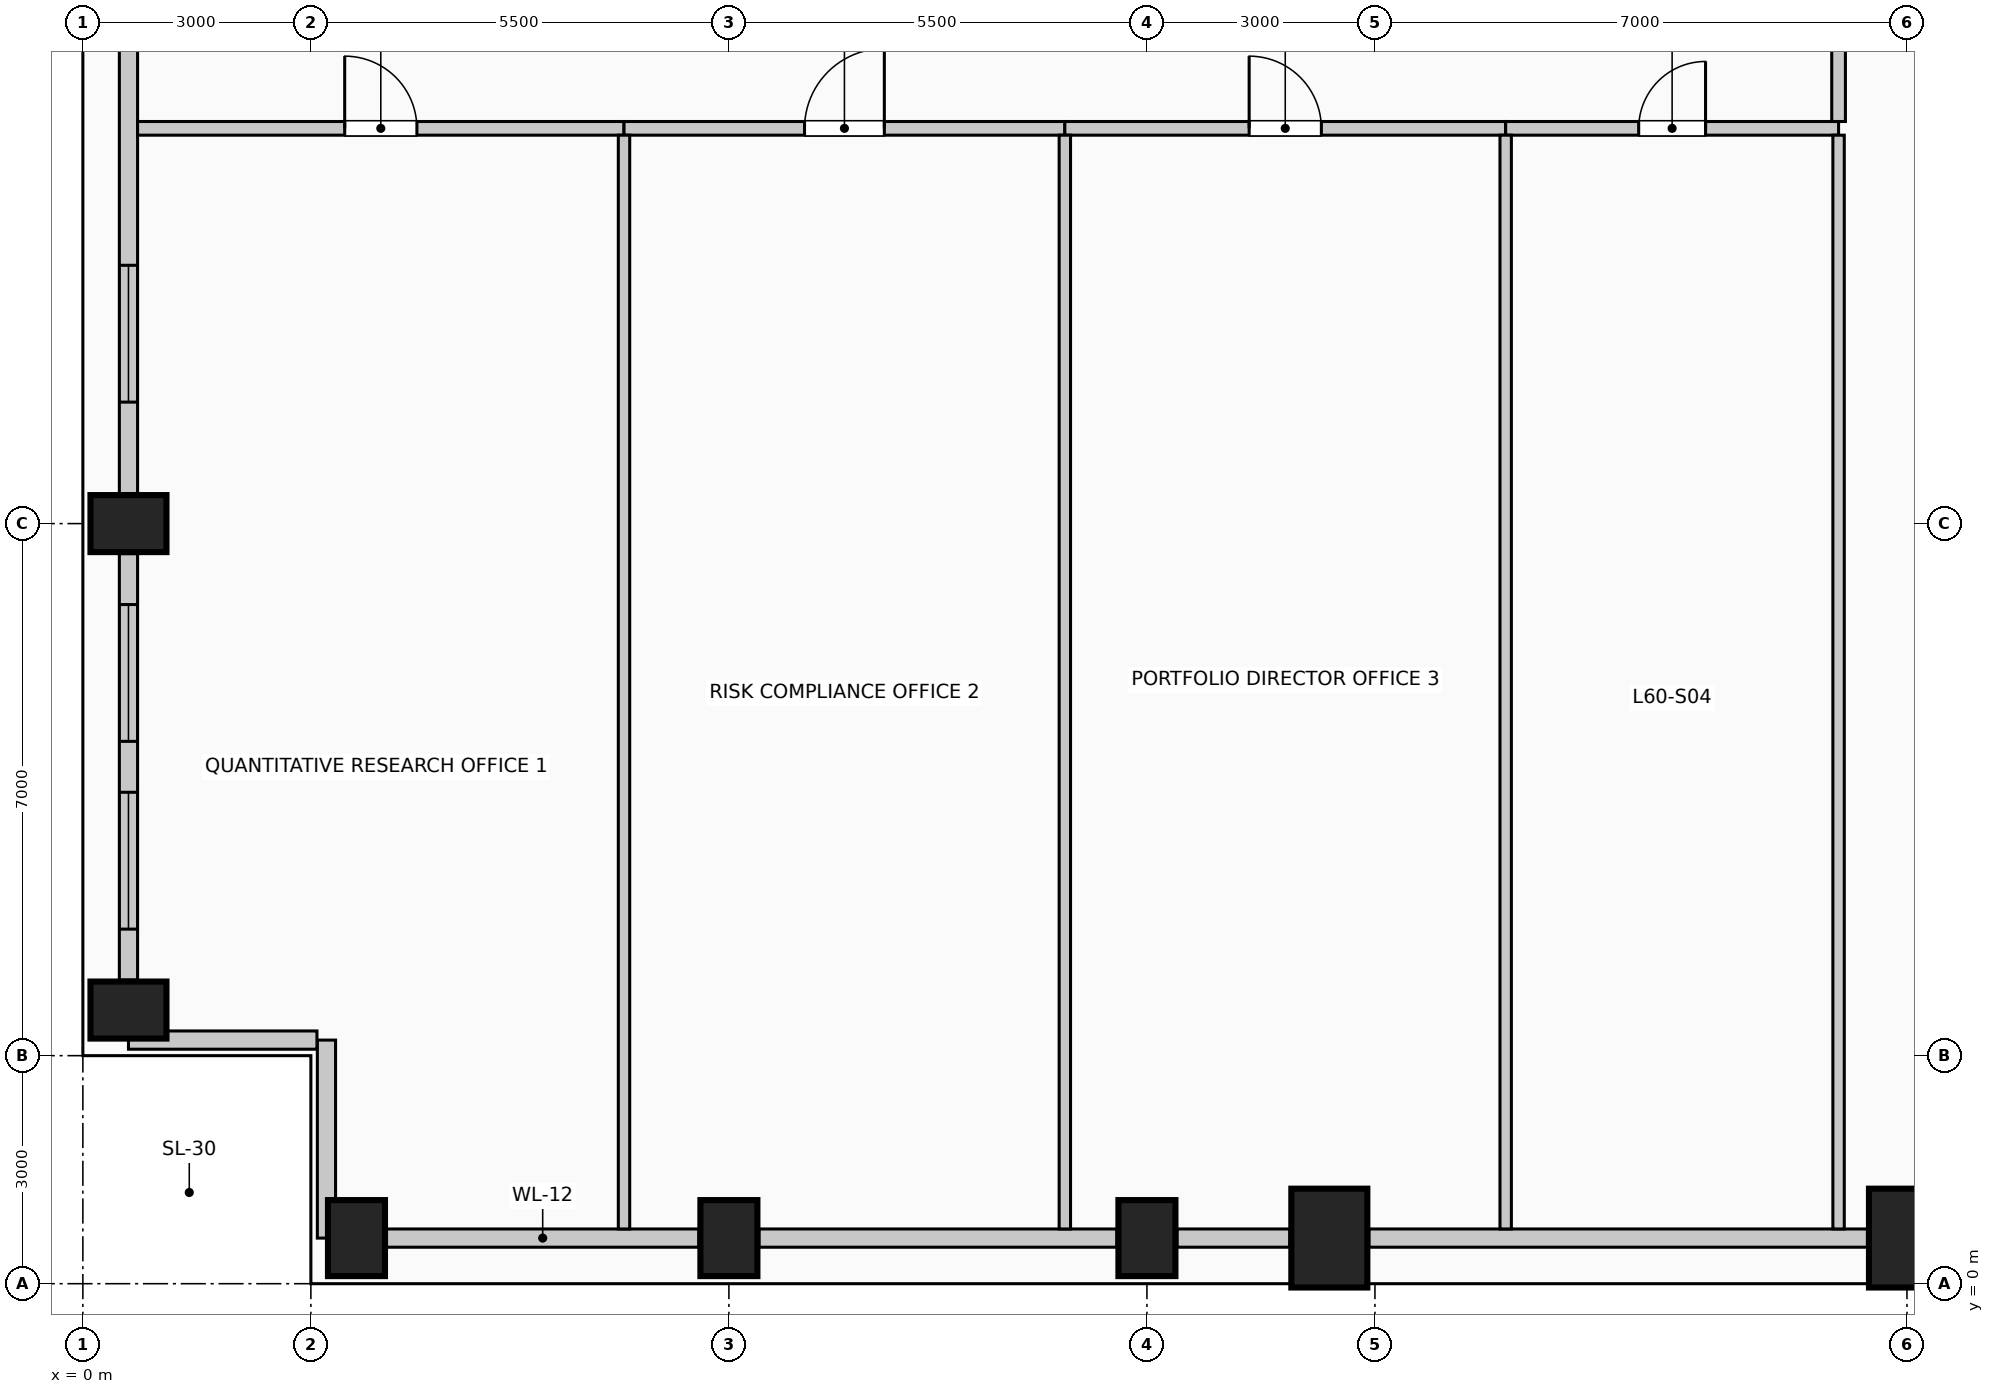
"""IFC4 building model, lengths in metres.
Left out: names, types, materials, properties, quantities, classifications, styles, units other than length and angle.
Written with IfcOpenShell. Run it as: python <this file> out.ifc"""

import sys

from ifc_helpers import new_model, si_unit, direction, frame, frame_2d, origin, origin_2d, place, context, subcontext, project, spatial, rectangle, extrude, element, fill, save


model = new_model("IFC4")
c1 = context("Model", 3, precision=1e-05, world=origin(), true_north=direction((0.0, 1.0)))
c2 = subcontext(c1, "Body", "Model", "MODEL_VIEW")
j1 = project(units=[si_unit("LENGTHUNIT", "METRE"), si_unit("PLANEANGLEUNIT", "RADIAN")], contexts=[c1])
p1 = place(None, origin())
s1 = spatial("IfcSite", under=j1, at=p1, CompositionType="ELEMENT")
p2 = place(p1, origin())
s2 = spatial("IfcBuilding", under=s1, at=p2, CompositionType="ELEMENT")
p3 = place(p2, frame((0.0, 0.0, 248.6)))
s3 = spatial("IfcBuildingStorey", under=s2, at=p3, CompositionType="ELEMENT", Elevation=248.6)
for number, where, z_axis, x_axis in (
    (1, (3.6, 0.6, 0.0), (0.0, 0.0, 1.0), (1.0, 0.0, 0.0)),
    (2, (8.5, 0.6, 0.0), (0.0, 0.0, 1.0), (1.0, 0.0, 0.0)),
    (3, (14.0, 0.6, 0.0), (0.0, 0.0, 1.0), (1.0, 0.0, 0.0)),
):
    element("IfcColumn", number, at=place(p3, frame(where, z_axis=z_axis, x_axis=x_axis)), inside=s3, PredefinedType="COLUMN", context=c2, shape_type="SweptSolid", body=[
        extrude(rectangle(XDim=0.75, YDim=1.0, at=origin_2d()), origin(), (0.0, 0.0, 1.0), 4.0),
    ])
for number, where, z_axis, x_axis in (
    (4, (16.4, 0.6, 0.0), (0.0, 0.0, 1.0), (1.0, 0.0, 0.0)),
    (5, (24.0, 0.6, 0.0), (0.0, 0.0, 1.0), (1.0, 0.0, 0.0)),
):
    element("IfcColumn", number, at=place(p3, frame(where, z_axis=z_axis, x_axis=x_axis)), inside=s3, PredefinedType="COLUMN", context=c2, shape_type="SweptSolid", body=[
        extrude(rectangle(XDim=1.0, YDim=1.3, at=origin_2d()), origin(), (0.0, 0.0, 1.0), 4.0),
    ])
for number, where, z_axis, x_axis in (
    (6, (0.6, 3.6, 0.0), (0.0, 0.0, 1.0), (0.0, 1.0, 0.0)),
    (7, (0.6, 10.0, 0.0), (0.0, 0.0, 1.0), (0.0, 1.0, 0.0)),
):
    element("IfcColumn", number, at=place(p3, frame(where, z_axis=z_axis, x_axis=x_axis)), inside=s3, PredefinedType="COLUMN", context=c2, shape_type="SweptSolid", body=[
        extrude(rectangle(XDim=0.75, YDim=1.0, at=origin_2d()), origin(), (0.0, 0.0, 1.0), 4.0),
    ])
p4 = place(p3, frame((8.105, 0.6, 0.0), z_axis=(0.0, 0.0, 1.0), x_axis=(-1.0, 0.0, 0.0)))
e8 = element("IfcWall", 8, at=p4, inside=s3, PredefinedType="SOLIDWALL", context=c2, shape_type="SweptSolid", body=[
    extrude(rectangle(XDim=4.11, YDim=0.24, at=frame_2d((2.055, 0.0))), origin(), (0.0, 0.0, 1.0), 3.0),
])
p5 = place(p3, frame((13.605, 0.6, 0.0), z_axis=(0.0, 0.0, 1.0), x_axis=(-1.0, 0.0, 0.0)))
e9 = element("IfcWall", 9, at=p5, inside=s3, PredefinedType="SOLIDWALL", context=c2, shape_type="SweptSolid", body=[
    extrude(rectangle(XDim=4.71, YDim=0.24, at=frame_2d((2.355, 0.0))), origin(), (0.0, 0.0, 1.0), 3.0),
])
p6 = place(p3, frame((15.88, 0.6, 0.0), z_axis=(0.0, 0.0, 1.0), x_axis=(-1.0, 0.0, 0.0)))
e10 = element("IfcWall", 10, at=p6, inside=s3, PredefinedType="SOLIDWALL", context=c2, shape_type="SweptSolid", body=[
    extrude(rectangle(XDim=1.485, YDim=0.24, at=frame_2d((0.742, 0.0))), origin(), (0.0, 0.0, 1.0), 3.0),
])
p7 = place(p3, frame((23.48, 0.6, 0.0), z_axis=(0.0, 0.0, 1.0), x_axis=(-1.0, 0.0, 0.0)))
e11 = element("IfcWall", 11, at=p7, inside=s3, PredefinedType="SOLIDWALL", context=c2, shape_type="SweptSolid", body=[
    extrude(rectangle(XDim=6.56, YDim=0.24, at=frame_2d((3.28, 0.0))), origin(), (0.0, 0.0, 1.0), 3.0),
])
p8 = place(p3, frame((0.6, 3.995, 0.0), z_axis=(0.0, 0.0, 1.0), x_axis=(0.0, 1.0, 0.0)))
e12 = element("IfcWall", 12, at=p8, inside=s3, PredefinedType="SOLIDWALL", context=c2, shape_type="SweptSolid", body=[
    extrude(rectangle(XDim=5.61, YDim=0.24, at=frame_2d((2.805, 0.0))), origin(), (0.0, 0.0, 1.0), 3.0),
])
p9 = place(p8, frame((0.67, 0.0, 0.42)))
e13 = element("IfcOpeningElement", 13, at=p9, cuts=e12, PredefinedType="OPENING", context=c2, shape_type="SweptSolid", body=[
    extrude(rectangle(XDim=1.8, YDim=2.2, at=frame_2d((0.9, 1.1))), frame((0.0, 0.13, 0.0), z_axis=(0.0, -1.0, 0.0), x_axis=(1.0, 0.0, 0.0)), (0.0, 0.0, 1.0), 0.26),
])
p10 = place(p8, frame((3.14, 0.0, 0.42)))
e14 = element("IfcOpeningElement", 14, at=p10, cuts=e12, PredefinedType="OPENING", context=c2, shape_type="SweptSolid", body=[
    extrude(rectangle(XDim=1.8, YDim=2.2, at=frame_2d((0.9, 1.1))), frame((0.0, 0.13, 0.0), z_axis=(0.0, -1.0, 0.0), x_axis=(1.0, 0.0, 0.0)), (0.0, 0.0, 1.0), 0.26),
])
p11 = place(p3, frame((0.6, 10.395, 0.0), z_axis=(0.0, 0.0, 1.0), x_axis=(0.0, 1.0, 0.0)))
e15 = element("IfcWall", 15, at=p11, inside=s3, PredefinedType="SOLIDWALL", context=c2, shape_type="SweptSolid", body=[
    extrude(rectangle(XDim=7.21, YDim=0.24, at=frame_2d((3.605, 0.0))), origin(), (0.0, 0.0, 1.0), 3.0),
])
p12 = place(p11, frame((1.203, 0.0, 0.42)))
e16 = element("IfcOpeningElement", 16, at=p12, cuts=e15, PredefinedType="OPENING", context=c2, shape_type="SweptSolid", body=[
    extrude(rectangle(XDim=1.8, YDim=2.2, at=frame_2d((0.9, 1.1))), frame((0.0, 0.13, 0.0), z_axis=(0.0, -1.0, 0.0), x_axis=(1.0, 0.0, 0.0)), (0.0, 0.0, 1.0), 0.26),
])
p13 = place(p3, frame((3.205, 0.6, 0.0), z_axis=(0.0, 0.0, 1.0), x_axis=(0.0, 1.0, 0.0)))
e17 = element("IfcWall", 17, at=p13, inside=s3, PredefinedType="SOLIDWALL", context=c2, shape_type="SweptSolid", body=[
    extrude(rectangle(XDim=2.605, YDim=0.24, at=frame_2d((1.302, 0.0))), origin(), (0.0, 0.0, 1.0), 3.75),
])
p14 = place(p3, frame((3.08, 3.205, 0.0), z_axis=(0.0, 0.0, 1.0), x_axis=(-1.0, 0.0, 0.0)))
e18 = element("IfcWall", 18, at=p14, inside=s3, PredefinedType="SOLIDWALL", context=c2, shape_type="SweptSolid", body=[
    extrude(rectangle(XDim=2.48, YDim=0.24, at=frame_2d((1.24, 0.0))), origin(), (0.0, 0.0, 1.0), 3.75),
])
p15 = place(p3, frame((0.72, 15.2, 0.0), z_axis=(0.0, 0.0, 1.0), x_axis=(1.0, 0.0, 0.0)))
e19 = element("IfcWall", 19, at=p15, inside=s3, PredefinedType="PARTITIONING", context=c2, shape_type="SweptSolid", body=[
    extrude(rectangle(XDim=6.4, YDim=0.18, at=frame_2d((3.2, 0.0))), origin(), (0.0, 0.0, 1.0), 3.75),
])
p16 = place(p15, frame((2.725, 0.0, 0.0)))
e20 = element("IfcOpeningElement", 20, at=p16, cuts=e19, PredefinedType="OPENING", context=c2, shape_type="SweptSolid", body=[
    extrude(rectangle(XDim=0.95, YDim=2.15, at=frame_2d((0.475, 1.075))), frame((0.0, 0.1, 0.0), z_axis=(0.0, -1.0, 0.0), x_axis=(1.0, 0.0, 0.0)), (0.0, 0.0, 1.0), 0.2),
])
p17 = place(p3, frame((7.12, 15.2, 0.0), z_axis=(0.0, 0.0, 1.0), x_axis=(1.0, 0.0, 0.0)))
e21 = element("IfcWall", 21, at=p17, inside=s3, PredefinedType="PARTITIONING", context=c2, shape_type="SweptSolid", body=[
    extrude(rectangle(XDim=5.8, YDim=0.18, at=frame_2d((2.9, 0.0))), origin(), (0.0, 0.0, 1.0), 3.75),
])
p18 = place(p17, frame((2.375, 0.0, 0.0)))
e22 = element("IfcOpeningElement", 22, at=p18, cuts=e21, PredefinedType="OPENING", context=c2, shape_type="SweptSolid", body=[
    extrude(rectangle(XDim=1.05, YDim=2.15, at=frame_2d((0.525, 1.075))), frame((0.0, 0.1, 0.0), z_axis=(0.0, -1.0, 0.0), x_axis=(1.0, 0.0, 0.0)), (0.0, 0.0, 1.0), 0.2),
])
p19 = place(p3, frame((12.92, 15.2, 0.0), z_axis=(0.0, 0.0, 1.0), x_axis=(1.0, 0.0, 0.0)))
e23 = element("IfcWall", 23, at=p19, inside=s3, PredefinedType="PARTITIONING", context=c2, shape_type="SweptSolid", body=[
    extrude(rectangle(XDim=5.8, YDim=0.18, at=frame_2d((2.9, 0.0))), origin(), (0.0, 0.0, 1.0), 3.75),
])
p20 = place(p19, frame((2.425, 0.0, 0.0)))
e24 = element("IfcOpeningElement", 24, at=p20, cuts=e23, PredefinedType="OPENING", context=c2, shape_type="SweptSolid", body=[
    extrude(rectangle(XDim=0.95, YDim=2.15, at=frame_2d((0.475, 1.075))), frame((0.0, 0.1, 0.0), z_axis=(0.0, -1.0, 0.0), x_axis=(1.0, 0.0, 0.0)), (0.0, 0.0, 1.0), 0.2),
])
p21 = place(p3, frame((18.72, 15.2, 0.0), z_axis=(0.0, 0.0, 1.0), x_axis=(1.0, 0.0, 0.0)))
e25 = element("IfcWall", 25, at=p21, inside=s3, PredefinedType="PARTITIONING", context=c2, shape_type="SweptSolid", body=[
    extrude(rectangle(XDim=4.38, YDim=0.18, at=frame_2d((2.19, 0.0))), origin(), (0.0, 0.0, 1.0), 3.75),
])
p22 = place(p21, frame((1.75, 0.0, 0.0)))
e26 = element("IfcOpeningElement", 26, at=p22, cuts=e25, PredefinedType="OPENING", context=c2, shape_type="SweptSolid", body=[
    extrude(rectangle(XDim=0.88, YDim=2.1, at=frame_2d((0.44, 1.05))), frame((0.0, 0.1, 0.0), z_axis=(0.0, -1.0, 0.0), x_axis=(1.0, 0.0, 0.0)), (0.0, 0.0, 1.0), 0.2),
])
for number, where, z_axis, x_axis in (
    (27, (7.12, 0.72, 0.0), (0.0, 0.0, 1.0), (0.0, 1.0, 0.0)),
    (28, (12.92, 0.72, 0.0), (0.0, 0.0, 1.0), (0.0, 1.0, 0.0)),
    (29, (18.72, 0.72, 0.0), (0.0, 0.0, 1.0), (0.0, 1.0, 0.0)),
    (30, (23.1, 0.72, 0.0), (0.0, 0.0, 1.0), (0.0, 1.0, 0.0)),
):
    element("IfcWall", number, at=place(p3, frame(where, z_axis=z_axis, x_axis=x_axis)), inside=s3, PredefinedType="PARTITIONING", context=c2, shape_type="SweptSolid", body=[
        extrude(rectangle(XDim=14.39, YDim=0.15, at=frame_2d((7.195, 0.0))), origin(), (0.0, 0.0, 1.0), 3.75),
    ])
p23 = place(p3, frame((23.1, 15.29, 0.0), z_axis=(0.0, 0.0, 1.0), x_axis=(0.0, 1.0, 0.0)))
e31 = element("IfcWall", 31, at=p23, inside=s3, PredefinedType="PARTITIONING", context=c2, shape_type="SweptSolid", body=[
    extrude(rectangle(XDim=2.01, YDim=0.18, at=frame_2d((1.005, 0.0))), origin(), (0.0, 0.0, 1.0), 3.75),
])
p24 = place(p9, origin())
e32 = element("IfcWindow", 32, at=p24, inside=s3, PartitioningType="SINGLE_PANEL", PredefinedType="WINDOW", context=c2, shape_type="SweptSolid", body=[
    extrude(rectangle(XDim=1.8, YDim=2.2, at=frame_2d((0.9, 1.1))), frame((0.0, 0.03, 0.0), z_axis=(0.0, -1.0, 0.0), x_axis=(1.0, 0.0, 0.0)), (0.0, 0.0, 1.0), 0.06),
])
fill(e13, e32)
p25 = place(p10, origin())
e33 = element("IfcWindow", 33, at=p25, inside=s3, PartitioningType="SINGLE_PANEL", PredefinedType="WINDOW", context=c2, shape_type="SweptSolid", body=[
    extrude(rectangle(XDim=1.8, YDim=2.2, at=frame_2d((0.9, 1.1))), frame((0.0, 0.03, 0.0), z_axis=(0.0, -1.0, 0.0), x_axis=(1.0, 0.0, 0.0)), (0.0, 0.0, 1.0), 0.06),
])
fill(e14, e33)
p26 = place(p12, origin())
e34 = element("IfcWindow", 34, at=p26, inside=s3, PartitioningType="SINGLE_PANEL", PredefinedType="WINDOW", context=c2, shape_type="SweptSolid", body=[
    extrude(rectangle(XDim=1.8, YDim=2.2, at=frame_2d((0.9, 1.1))), frame((0.0, 0.03, 0.0), z_axis=(0.0, -1.0, 0.0), x_axis=(1.0, 0.0, 0.0)), (0.0, 0.0, 1.0), 0.06),
])
fill(e16, e34)
p27 = place(p16, origin())
e35 = element("IfcDoor", 35, at=p27, inside=s3, OperationType="SINGLE_SWING_LEFT", PredefinedType="DOOR", context=c2, shape_type="SweptSolid", body=[
    extrude(rectangle(XDim=0.95, YDim=2.15, at=frame_2d((0.475, 1.075))), frame((0.0, 0.025, 0.0), z_axis=(0.0, -1.0, 0.0), x_axis=(1.0, 0.0, 0.0)), (0.0, 0.0, 1.0), 0.05),
])
fill(e20, e35)
p28 = place(p18, origin())
e36 = element("IfcDoor", 36, at=p28, inside=s3, OperationType="SINGLE_SWING_RIGHT", PredefinedType="DOOR", context=c2, shape_type="SweptSolid", body=[
    extrude(rectangle(XDim=1.05, YDim=2.15, at=frame_2d((0.525, 1.075))), frame((0.0, 0.025, 0.0), z_axis=(0.0, -1.0, 0.0), x_axis=(1.0, 0.0, 0.0)), (0.0, 0.0, 1.0), 0.05),
])
fill(e22, e36)
p29 = place(p20, origin())
e37 = element("IfcDoor", 37, at=p29, inside=s3, OperationType="SINGLE_SWING_LEFT", PredefinedType="DOOR", context=c2, shape_type="SweptSolid", body=[
    extrude(rectangle(XDim=0.95, YDim=2.15, at=frame_2d((0.475, 1.075))), frame((0.0, 0.025, 0.0), z_axis=(0.0, -1.0, 0.0), x_axis=(1.0, 0.0, 0.0)), (0.0, 0.0, 1.0), 0.05),
])
fill(e24, e37)
p30 = place(p22, origin())
e38 = element("IfcDoor", 38, at=p30, inside=s3, OperationType="SINGLE_SWING_RIGHT", PredefinedType="DOOR", context=c2, shape_type="SweptSolid", body=[
    extrude(rectangle(XDim=0.88, YDim=2.1, at=frame_2d((0.44, 1.05))), frame((0.0, 0.025, 0.0), z_axis=(0.0, -1.0, 0.0), x_axis=(1.0, 0.0, 0.0)), (0.0, 0.0, 1.0), 0.05),
])
fill(e26, e38)
save(model, sys.argv[1])
